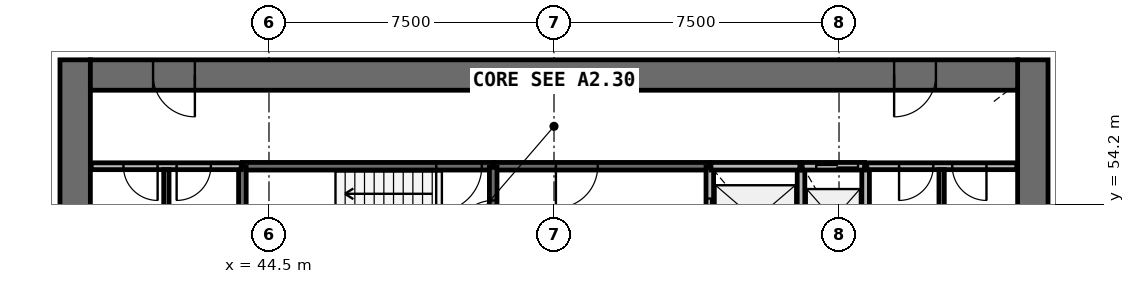
"""IFC4 building model, lengths in metres.
Left out: names, types, materials, properties, quantities, classifications, styles, units other than length and angle.
Written with IfcOpenShell. Run it as: python <this file> out.ifc"""

import sys

from ifc_helpers import new_model, si_unit, direction, frame, frame_2d, origin, place, context, subcontext, project, spatial, rectangle, extrude, source, transform, mapped, element, fill, save


model = new_model("IFC4")
c1 = context("Model", 3, precision=1e-05, world=origin(), true_north=direction((0.0, 1.0)))
c2 = subcontext(c1, "Body", "Model", "MODEL_VIEW")
j1 = project(units=[si_unit("LENGTHUNIT", "METRE"), si_unit("PLANEANGLEUNIT", "RADIAN")], contexts=[c1])
p1 = place(None, origin())
s1 = spatial("IfcSite", under=j1, at=p1, CompositionType="ELEMENT")
p2 = place(p1, origin())
s2 = spatial("IfcBuilding", under=s1, at=p2, CompositionType="ELEMENT")
p3 = place(p2, frame((0.0, 0.0, 124.9)))
s3 = spatial("IfcBuildingStorey", under=s2, at=p3, CompositionType="ELEMENT", Elevation=124.9)
p4 = place(p3, frame((64.6, 38.0, 0.0), z_axis=(0.0, 0.0, 1.0), x_axis=(0.0, 1.0, 0.0)))
e1 = element("IfcWall", 1, at=p4, inside=s3, PredefinedType="SHEAR", context=c2, shape_type="SweptSolid", body=[
    extrude(rectangle(XDim=20.0, YDim=0.8, at=frame_2d((10.0, 0.0))), origin(), (0.0, 0.0, 1.0), 4.1),
])
p5 = place(p4, frame((9.1, 0.0, 0.0)))
e2 = element("IfcOpeningElement", 2, at=p5, cuts=e1, PredefinedType="OPENING", context=c2, shape_type="SweptSolid", body=[
    extrude(rectangle(XDim=1.8, YDim=2.1, at=frame_2d((0.9, 1.05))), frame((0.0, 0.41, 0.0), z_axis=(0.0, -1.0, 0.0), x_axis=(1.0, 0.0, 0.0)), (0.0, 0.0, 1.0), 0.82),
])
p6 = place(p3, frame((39.4, 58.0, 0.0), z_axis=(0.0, 0.0, 1.0), x_axis=(0.0, -1.0, 0.0)))
e3 = element("IfcWall", 3, at=p6, inside=s3, PredefinedType="SHEAR", context=c2, shape_type="SweptSolid", body=[
    extrude(rectangle(XDim=20.0, YDim=0.8, at=frame_2d((10.0, 0.0))), origin(), (0.0, 0.0, 1.0), 4.1),
])
p7 = place(p6, frame((9.1, 0.0, 0.0)))
e4 = element("IfcOpeningElement", 4, at=p7, cuts=e3, PredefinedType="OPENING", context=c2, shape_type="SweptSolid", body=[
    extrude(rectangle(XDim=1.8, YDim=2.1, at=frame_2d((0.9, 1.05))), frame((0.0, 0.41, 0.0), z_axis=(0.0, -1.0, 0.0), x_axis=(1.0, 0.0, 0.0)), (0.0, 0.0, 1.0), 0.82),
])
p8 = place(p3, frame((64.2, 57.6, 0.0), z_axis=(0.0, 0.0, 1.0), x_axis=(-1.0, 0.0, 0.0)))
e5 = element("IfcWall", 5, at=p8, inside=s3, PredefinedType="SHEAR", context=c2, shape_type="SweptSolid", body=[
    extrude(rectangle(XDim=24.4, YDim=0.8, at=frame_2d((12.2, 0.0))), origin(), (0.0, 0.0, 1.0), 4.1),
])
p9 = place(p8, frame((21.65, 0.0, 0.0)))
e6 = element("IfcOpeningElement", 6, at=p9, cuts=e5, PredefinedType="OPENING", context=c2, shape_type="SweptSolid", body=[
    extrude(rectangle(XDim=1.1, YDim=2.1, at=frame_2d((0.55, 1.05))), frame((0.0, 0.41, 0.0), z_axis=(0.0, -1.0, 0.0), x_axis=(1.0, 0.0, 0.0)), (0.0, 0.0, 1.0), 0.82),
])
p10 = place(p8, frame((2.15, 0.0, 0.0)))
e7 = element("IfcOpeningElement", 7, at=p10, cuts=e5, PredefinedType="OPENING", context=c2, shape_type="SweptSolid", body=[
    extrude(rectangle(XDim=1.1, YDim=2.1, at=frame_2d((0.55, 1.05))), frame((0.0, 0.41, 0.0), z_axis=(0.0, -1.0, 0.0), x_axis=(1.0, 0.0, 0.0)), (0.0, 0.0, 1.0), 0.82),
])
p11 = place(p3, frame((50.4, 55.2, 0.0), z_axis=(0.0, 0.0, 1.0), x_axis=(-1.0, 0.0, 0.0)))
e8 = element("IfcWall", 8, at=p11, inside=s3, PredefinedType="SOLIDWALL", context=c2, shape_type="SweptSolid", body=[
    extrude(rectangle(XDim=6.6, YDim=0.2, at=frame_2d((3.3, 0.0))), origin(), (0.0, 0.0, 1.0), 3.6),
])
p12 = place(p11, frame((0.3, 0.0, 0.0)))
e9 = element("IfcOpeningElement", 9, at=p12, cuts=e8, PredefinedType="OPENING", context=c2, shape_type="SweptSolid", body=[
    extrude(rectangle(XDim=1.2, YDim=2.1, at=frame_2d((0.6, 1.05))), frame((0.0, 0.11, 0.0), z_axis=(0.0, -1.0, 0.0), x_axis=(1.0, 0.0, 0.0)), (0.0, 0.0, 1.0), 0.22),
])
p13 = place(p3, frame((56.1, 55.2, 0.0), z_axis=(0.0, 0.0, 1.0), x_axis=(-1.0, 0.0, 0.0)))
e10 = element("IfcWall", 10, at=p13, inside=s3, PredefinedType="SOLIDWALL", context=c2, shape_type="SweptSolid", body=[
    extrude(rectangle(XDim=5.67, YDim=0.2, at=frame_2d((2.835, 0.0))), origin(), (0.0, 0.0, 1.0), 3.6),
])
p14 = place(p13, frame((2.95, 0.0, 0.0)))
e11 = element("IfcOpeningElement", 11, at=p14, cuts=e10, PredefinedType="OPENING", context=c2, shape_type="SweptSolid", body=[
    extrude(rectangle(XDim=1.1, YDim=2.1, at=frame_2d((0.55, 1.05))), frame((0.0, 0.11, 0.0), z_axis=(0.0, -1.0, 0.0), x_axis=(1.0, 0.0, 0.0)), (0.0, 0.0, 1.0), 0.22),
])
p15 = place(p3, frame((50.4, 52.4, 0.0), z_axis=(0.0, 0.0, 1.0), x_axis=(0.0, 1.0, 0.0)))
e12 = element("IfcWall", 12, at=p15, inside=s3, PredefinedType="SOLIDWALL", context=c2, shape_type="SweptSolid", body=[
    extrude(rectangle(XDim=2.77, YDim=0.2, at=frame_2d((1.385, 0.0))), origin(), (0.0, 0.0, 1.0), 3.6),
])
p16 = place(p15, frame((0.9, 0.0, 0.0)))
e13 = element("IfcOpeningElement", 13, at=p16, cuts=e12, PredefinedType="OPENING", context=c2, shape_type="SweptSolid", body=[
    extrude(rectangle(XDim=1.0, YDim=2.1, at=frame_2d((0.5, 1.05))), frame((0.0, 0.11, 0.0), z_axis=(0.0, -1.0, 0.0), x_axis=(1.0, 0.0, 0.0)), (0.0, 0.0, 1.0), 0.22),
])
p17 = place(p3, frame((56.1, 55.17, 0.0), z_axis=(0.0, 0.0, 1.0), x_axis=(0.0, -1.0, 0.0)))
e14 = element("IfcWall", 14, at=p17, inside=s3, PredefinedType="SOLIDWALL", context=c2, shape_type="SweptSolid", body=[
    extrude(rectangle(XDim=2.77, YDim=0.2, at=frame_2d((1.385, 0.0))), origin(), (0.0, 0.0, 1.0), 3.6),
])
p18 = place(p17, frame((0.82, 0.0, 0.0)))
e15 = element("IfcOpeningElement", 15, at=p18, cuts=e14, PredefinedType="OPENING", context=c2, shape_type="SweptSolid", body=[
    extrude(rectangle(XDim=1.1, YDim=2.1, at=frame_2d((0.55, 1.05))), frame((0.0, 0.11, 0.0), z_axis=(0.0, -1.0, 0.0), x_axis=(1.0, 0.0, 0.0)), (0.0, 0.0, 1.0), 0.22),
])
for number, where, z_axis, x_axis in (
    (16, (58.5, 52.4, 0.0), (0.0, 0.0, 1.0), (0.0, 1.0, 0.0)),
    (17, (60.2, 52.4, 0.0), (0.0, 0.0, 1.0), (0.0, 1.0, 0.0)),
):
    element("IfcWall", number, at=place(p3, frame(where, z_axis=z_axis, x_axis=x_axis)), inside=s3, PredefinedType="SOLIDWALL", context=c2, shape_type="SweptSolid", body=[
        extrude(rectangle(XDim=2.8, YDim=0.2, at=frame_2d((1.4, 0.0))), origin(), (0.0, 0.0, 1.0), 3.6),
    ])
p19 = place(p3, frame((58.47, 55.2, 0.0), z_axis=(0.0, 0.0, 1.0), x_axis=(-1.0, 0.0, 0.0)))
e18 = element("IfcWall", 18, at=p19, inside=s3, PredefinedType="SOLIDWALL", context=c2, shape_type="SweptSolid", body=[
    extrude(rectangle(XDim=2.34, YDim=0.2, at=frame_2d((1.17, 0.0))), origin(), (0.0, 0.0, 1.0), 3.6),
])
p20 = place(p3, frame((43.8, 55.17, 0.0), z_axis=(0.0, 0.0, 1.0), x_axis=(0.0, -1.0, 0.0)))
e19 = element("IfcWall", 19, at=p20, inside=s3, PredefinedType="SOLIDWALL", context=c2, shape_type="SweptSolid", body=[
    extrude(rectangle(XDim=2.14, YDim=0.2, at=frame_2d((1.07, 0.0))), origin(), (0.0, 0.0, 1.0), 3.6),
])
p21 = place(p3, frame((60.17, 55.2, 0.0), z_axis=(0.0, 0.0, 1.0), x_axis=(-1.0, 0.0, 0.0)))
e20 = element("IfcWall", 20, at=p21, inside=s3, PredefinedType="SOLIDWALL", context=c2, shape_type="SweptSolid", body=[
    extrude(rectangle(XDim=1.64, YDim=0.2, at=frame_2d((0.82, 0.0))), origin(), (0.0, 0.0, 1.0), 3.6),
])
p22 = place(p21, frame((0.17, 0.0, 0.0)))
e21 = element("IfcOpeningElement", 21, at=p22, cuts=e20, PredefinedType="OPENING", context=c2, shape_type="SweptSolid", body=[
    extrude(rectangle(XDim=1.1, YDim=2.1, at=frame_2d((0.55, 1.05))), frame((0.0, 0.11, 0.0), z_axis=(0.0, -1.0, 0.0), x_axis=(1.0, 0.0, 0.0)), (0.0, 0.0, 1.0), 0.22),
])
p23 = place(p3, frame((64.18, 55.2, 0.0), z_axis=(0.0, 0.0, 1.0), x_axis=(-1.0, 0.0, 0.0)))
e22 = element("IfcWall", 22, at=p23, inside=s3, PredefinedType="PARTITIONING", context=c2, shape_type="SweptSolid", body=[
    extrude(rectangle(XDim=3.95, YDim=0.18, at=frame_2d((1.975, 0.0))), origin(), (0.0, 0.0, 1.0), 3.6),
])
p24 = place(p23, frame((2.2, 0.0, 0.0)))
e23 = element("IfcOpeningElement", 23, at=p24, cuts=e22, PredefinedType="OPENING", context=c2, shape_type="SweptSolid", body=[
    extrude(rectangle(XDim=0.9, YDim=2.1, at=frame_2d((0.45, 1.05))), frame((0.0, 0.1, 0.0), z_axis=(0.0, -1.0, 0.0), x_axis=(1.0, 0.0, 0.0)), (0.0, 0.0, 1.0), 0.2),
])
p25 = place(p23, frame((0.8, 0.0, 0.0)))
e24 = element("IfcOpeningElement", 24, at=p25, cuts=e22, PredefinedType="OPENING", context=c2, shape_type="SweptSolid", body=[
    extrude(rectangle(XDim=0.9, YDim=2.1, at=frame_2d((0.45, 1.05))), frame((0.0, 0.1, 0.0), z_axis=(0.0, -1.0, 0.0), x_axis=(1.0, 0.0, 0.0)), (0.0, 0.0, 1.0), 0.2),
])
p26 = place(p3, frame((43.77, 55.2, 0.0), z_axis=(0.0, 0.0, 1.0), x_axis=(-1.0, 0.0, 0.0)))
e25 = element("IfcWall", 25, at=p26, inside=s3, PredefinedType="PARTITIONING", context=c2, shape_type="SweptSolid", body=[
    extrude(rectangle(XDim=3.95, YDim=0.18, at=frame_2d((1.975, 0.0))), origin(), (0.0, 0.0, 1.0), 3.6),
])
p27 = place(p26, frame((2.2, 0.0, 0.0)))
e26 = element("IfcOpeningElement", 26, at=p27, cuts=e25, PredefinedType="OPENING", context=c2, shape_type="SweptSolid", body=[
    extrude(rectangle(XDim=0.9, YDim=2.1, at=frame_2d((0.45, 1.05))), frame((0.0, 0.1, 0.0), z_axis=(0.0, -1.0, 0.0), x_axis=(1.0, 0.0, 0.0)), (0.0, 0.0, 1.0), 0.2),
])
p28 = place(p26, frame((0.8, 0.0, 0.0)))
e27 = element("IfcOpeningElement", 27, at=p28, cuts=e25, PredefinedType="OPENING", context=c2, shape_type="SweptSolid", body=[
    extrude(rectangle(XDim=0.9, YDim=2.1, at=frame_2d((0.45, 1.05))), frame((0.0, 0.1, 0.0), z_axis=(0.0, -1.0, 0.0), x_axis=(1.0, 0.0, 0.0)), (0.0, 0.0, 1.0), 0.2),
])
p29 = place(p3, frame((62.2, 52.4, 0.0), z_axis=(0.0, 0.0, 1.0), x_axis=(0.0, 1.0, 0.0)))
e28 = element("IfcWall", 28, at=p29, inside=s3, PredefinedType="PARTITIONING", context=c2, shape_type="SweptSolid", body=[
    extrude(rectangle(XDim=2.71, YDim=0.14, at=frame_2d((1.355, 0.0))), origin(), (0.0, 0.0, 1.0), 2.8),
])
p30 = place(p3, frame((41.8, 53.1, 0.0), z_axis=(0.0, 0.0, 1.0), x_axis=(0.0, 1.0, 0.0)))
e29 = element("IfcWall", 29, at=p30, inside=s3, PredefinedType="PARTITIONING", context=c2, shape_type="SweptSolid", body=[
    extrude(rectangle(XDim=2.01, YDim=0.14, at=frame_2d((1.005, 0.0))), origin(), (0.0, 0.0, 1.0), 2.8),
])
m1 = source(origin(), c2, "Body", "SweptSolid", [
    extrude(rectangle(XDim=1.1, YDim=2.1, at=frame_2d((0.55, 1.05))), frame((0.0, 0.025, 0.0), z_axis=(0.0, -1.0, 0.0), x_axis=(1.0, 0.0, 0.0)), (0.0, 0.0, 1.0), 0.05),
])
p31 = place(p18, origin())
e30 = element("IfcDoor", 30, at=p31, inside=s3, OperationType="DOUBLE_DOOR_SLIDING", PredefinedType="USERDEFINED", context=c2, shape_type="MappedRepresentation", body=[
    mapped(m1, transform((0.0, 0.0, 0.0), scale=1.0)),
])
fill(e15, e30)
p32 = place(p22, origin())
e31 = element("IfcDoor", 31, at=p32, inside=s3, OperationType="DOUBLE_DOOR_SLIDING", PredefinedType="USERDEFINED", context=c2, shape_type="MappedRepresentation", body=[
    mapped(m1, transform((0.0, 0.0, 0.0), scale=1.0)),
])
fill(e21, e31)
m2 = source(origin(), c2, "Body", "SweptSolid", [
    extrude(rectangle(XDim=1.2, YDim=2.1, at=frame_2d((0.6, 1.05))), frame((0.0, 0.025, 0.0), z_axis=(0.0, -1.0, 0.0), x_axis=(1.0, 0.0, 0.0)), (0.0, 0.0, 1.0), 0.05),
])
p33 = place(p12, origin())
e32 = element("IfcDoor", 32, at=p33, inside=s3, OperationType="SINGLE_SWING_RIGHT", PredefinedType="DOOR", context=c2, shape_type="MappedRepresentation", body=[
    mapped(m2, transform((0.0, 0.0, 0.0), scale=1.0)),
])
fill(e9, e32)
m3 = source(origin(), c2, "Body", "SweptSolid", [
    extrude(rectangle(XDim=1.0, YDim=2.1, at=frame_2d((0.5, 1.05))), frame((0.0, 0.025, 0.0), z_axis=(0.0, -1.0, 0.0), x_axis=(1.0, 0.0, 0.0)), (0.0, 0.0, 1.0), 0.05),
])
p34 = place(p16, origin())
e33 = element("IfcDoor", 33, at=p34, inside=s3, OperationType="SINGLE_SWING_LEFT", PredefinedType="DOOR", context=c2, shape_type="MappedRepresentation", body=[
    mapped(m3, transform((0.0, 0.0, 0.0), scale=1.0)),
])
fill(e13, e33)
m4 = source(origin(), c2, "Body", "SweptSolid", [
    extrude(rectangle(XDim=1.1, YDim=2.1, at=frame_2d((0.55, 1.05))), frame((0.0, 0.025, 0.0), z_axis=(0.0, -1.0, 0.0), x_axis=(1.0, 0.0, 0.0)), (0.0, 0.0, 1.0), 0.05),
])
p35 = place(p14, origin())
e34 = element("IfcDoor", 34, at=p35, inside=s3, OperationType="SINGLE_SWING_RIGHT", PredefinedType="DOOR", context=c2, shape_type="MappedRepresentation", body=[
    mapped(m4, transform((0.0, 0.0, 0.0), scale=1.0)),
])
fill(e11, e34)
m5 = source(origin(), c2, "Body", "SweptSolid", [
    extrude(rectangle(XDim=1.1, YDim=2.1, at=frame_2d((0.55, 1.05))), frame((0.0, 0.025, 0.0), z_axis=(0.0, -1.0, 0.0), x_axis=(1.0, 0.0, 0.0)), (0.0, 0.0, 1.0), 0.05),
])
p36 = place(p9, origin())
e35 = element("IfcDoor", 35, at=p36, inside=s3, OperationType="SINGLE_SWING_LEFT", PredefinedType="DOOR", context=c2, shape_type="MappedRepresentation", body=[
    mapped(m5, transform((0.0, 0.0, 0.0), scale=1.0)),
])
fill(e6, e35)
p37 = place(p10, origin())
e36 = element("IfcDoor", 36, at=p37, inside=s3, OperationType="SINGLE_SWING_RIGHT", PredefinedType="DOOR", context=c2, shape_type="MappedRepresentation", body=[
    mapped(m5, transform((0.0, 0.0, 0.0), scale=1.0)),
])
fill(e7, e36)
m6 = source(origin(), c2, "Body", "SweptSolid", [
    extrude(rectangle(XDim=0.9, YDim=2.1, at=frame_2d((0.45, 1.05))), frame((0.0, 0.025, 0.0), z_axis=(0.0, -1.0, 0.0), x_axis=(1.0, 0.0, 0.0)), (0.0, 0.0, 1.0), 0.05),
])
p38 = place(p27, origin())
e37 = element("IfcDoor", 37, at=p38, inside=s3, OperationType="SINGLE_SWING_LEFT", PredefinedType="DOOR", context=c2, shape_type="MappedRepresentation", body=[
    mapped(m6, transform((0.0, 0.0, 0.0), scale=1.0)),
])
fill(e26, e37)
p39 = place(p28, origin())
e38 = element("IfcDoor", 38, at=p39, inside=s3, OperationType="SINGLE_SWING_RIGHT", PredefinedType="DOOR", context=c2, shape_type="MappedRepresentation", body=[
    mapped(m6, transform((0.0, 0.0, 0.0), scale=1.0)),
])
fill(e27, e38)
p40 = place(p24, origin())
e39 = element("IfcDoor", 39, at=p40, inside=s3, OperationType="SINGLE_SWING_RIGHT", PredefinedType="DOOR", context=c2, shape_type="MappedRepresentation", body=[
    mapped(m6, transform((0.0, 0.0, 0.0), scale=1.0)),
])
fill(e23, e39)
p41 = place(p25, origin())
e40 = element("IfcDoor", 40, at=p41, inside=s3, OperationType="SINGLE_SWING_LEFT", PredefinedType="DOOR", context=c2, shape_type="MappedRepresentation", body=[
    mapped(m6, transform((0.0, 0.0, 0.0), scale=1.0)),
])
fill(e24, e40)
save(model, sys.argv[1])
